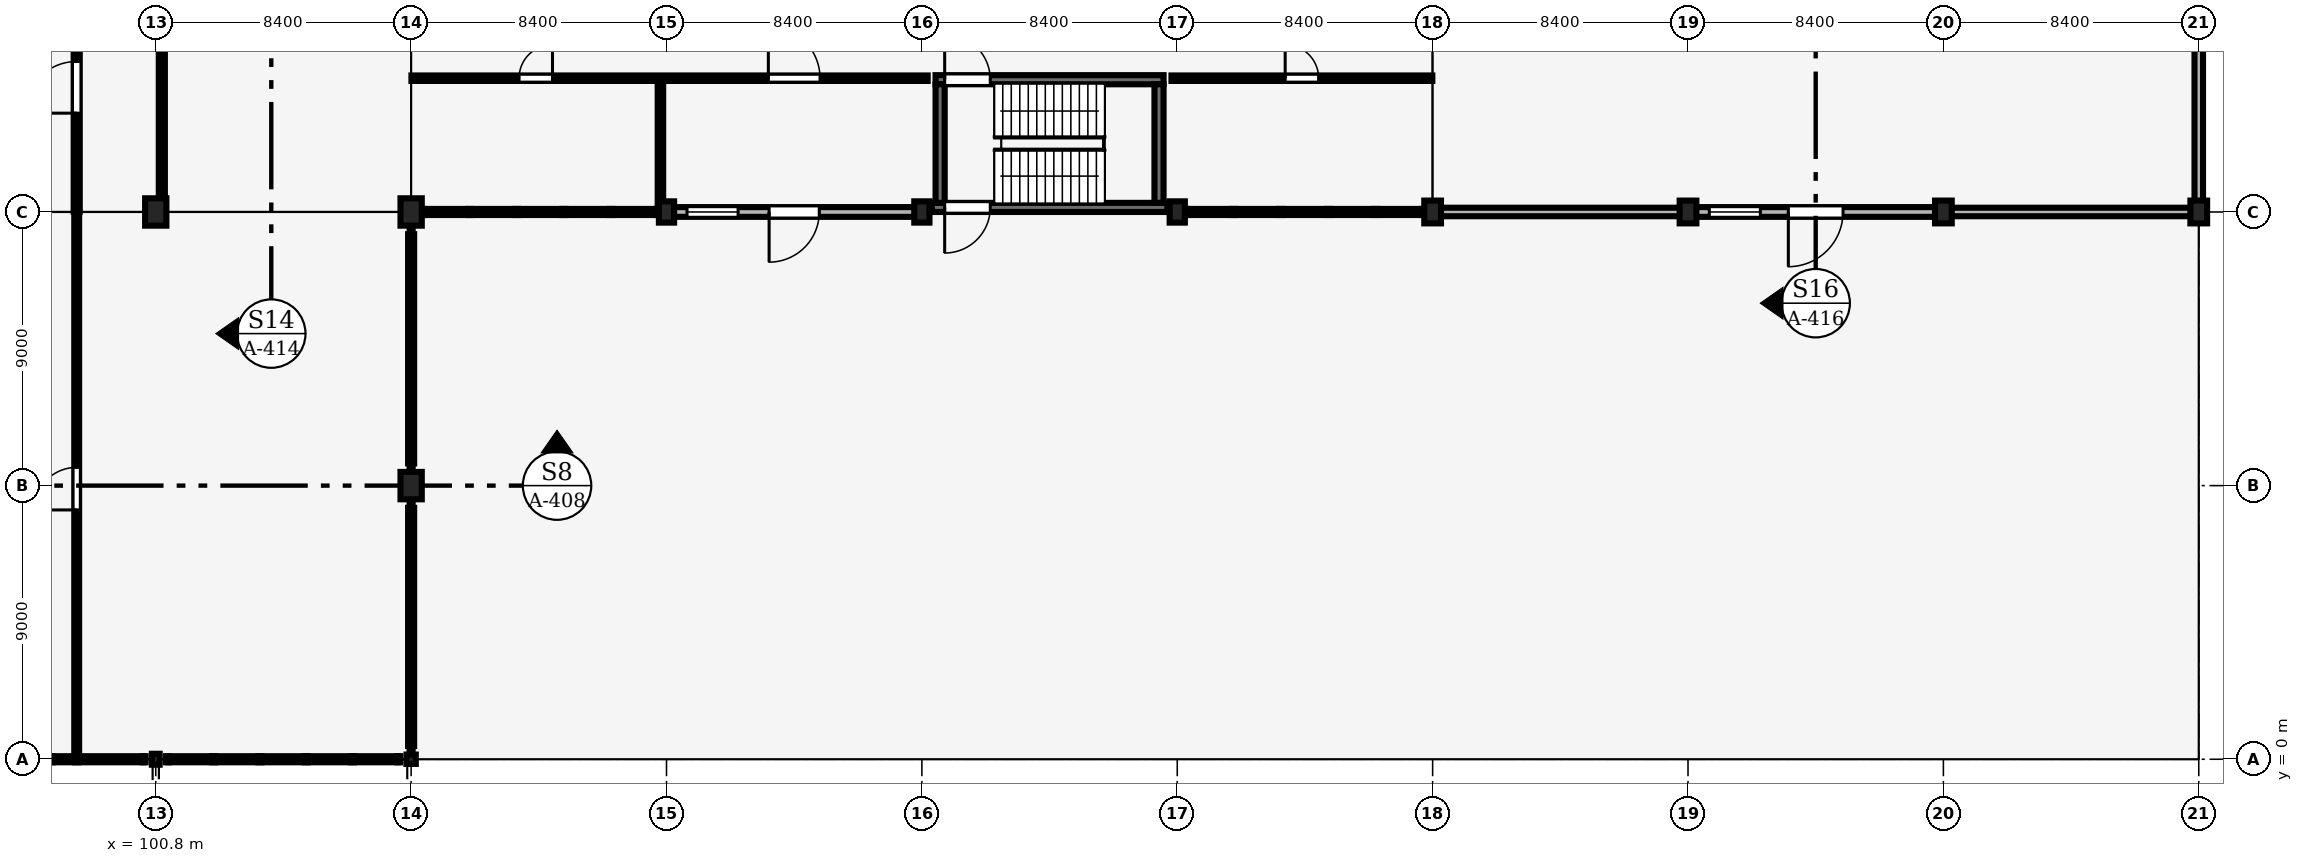
"""IFC4 building model, lengths in metres.
Left out: names, types, materials, properties, quantities, classifications, styles, units other than length and angle.
Written with IfcOpenShell. Run it as: python <this file> out.ifc"""

import sys

from ifc_helpers import new_model, si_unit, direction, frame, frame_2d, origin, origin_2d, place, context, subcontext, project, spatial, rectangle, i_section, extrude, element, fill, save


model = new_model("IFC4")
c1 = context("Model", 3, precision=1e-05, world=origin(), true_north=direction((0.0, 1.0)))
c2 = subcontext(c1, "Body", "Model", "MODEL_VIEW")
j1 = project(units=[si_unit("LENGTHUNIT", "METRE"), si_unit("PLANEANGLEUNIT", "RADIAN")], contexts=[c1])
p1 = place(None, origin())
s1 = spatial("IfcSite", under=j1, at=p1, CompositionType="ELEMENT")
p2 = place(p1, origin())
s2 = spatial("IfcBuilding", under=s1, at=p2, CompositionType="ELEMENT")
p3 = place(p2, origin())
s3 = spatial("IfcBuildingStorey", under=s2, at=p3, CompositionType="ELEMENT", Elevation=0.0)
p4 = place(p3, frame((100.8, 0.0, 0.0), z_axis=(0.0, 0.0, 1.0), x_axis=(1.0, 0.0, 0.0)))
e1 = element("IfcColumn", 1, at=p4, inside=s3, PredefinedType="COLUMN", context=c2, shape_type="SweptSolid", body=[
    extrude(i_section(OverallWidth=0.256, OverallDepth=0.36, WebThickness=0.011, FlangeThickness=0.02, FilletRadius=0.015, at=origin_2d()), origin(), (0.0, 0.0, 1.0), 4.8),
])
p5 = place(p3, frame((100.8, 18.0, 0.0), z_axis=(0.0, 0.0, 1.0), x_axis=(1.0, 0.0, 0.0)))
e2 = element("IfcColumn", 2, at=p5, inside=s3, PredefinedType="COLUMN", context=c2, shape_type="SweptSolid", body=[
    extrude(rectangle(XDim=0.7, YDim=0.9, at=origin_2d()), origin(), (0.0, 0.0, 1.0), 4.8),
])
p6 = place(p3, frame((109.2, 0.0, 0.0), z_axis=(0.0, 0.0, 1.0), x_axis=(1.0, 0.0, 0.0)))
e3 = element("IfcColumn", 3, at=p6, inside=s3, PredefinedType="COLUMN", context=c2, shape_type="SweptSolid", body=[
    extrude(i_section(OverallWidth=0.305, OverallDepth=0.308, WebThickness=0.01, FlangeThickness=0.015, FilletRadius=0.013, at=origin_2d()), origin(), (0.0, 0.0, 1.0), 4.8),
])
for number, where, z_axis, x_axis in (
    (4, (109.2, 9.0, 0.0), (0.0, 0.0, 1.0), (1.0, 0.0, 0.0)),
    (5, (109.2, 18.0, 0.0), (0.0, 0.0, 1.0), (1.0, 0.0, 0.0)),
):
    element("IfcColumn", number, at=place(p3, frame(where, z_axis=z_axis, x_axis=x_axis)), inside=s3, PredefinedType="COLUMN", context=c2, shape_type="SweptSolid", body=[
        extrude(rectangle(XDim=0.7, YDim=0.9, at=origin_2d()), origin(), (0.0, 0.0, 1.0), 4.8),
    ])
for number, where, z_axis, x_axis in (
    (6, (117.6, 18.0, 0.0), (0.0, 0.0, 1.0), (1.0, 0.0, 0.0)),
    (7, (126.0, 18.0, 0.0), (0.0, 0.0, 1.0), (1.0, 0.0, 0.0)),
    (8, (134.4, 18.0, 0.0), (0.0, 0.0, 1.0), (1.0, 0.0, 0.0)),
):
    element("IfcColumn", number, at=place(p3, frame(where, z_axis=z_axis, x_axis=x_axis)), inside=s3, PredefinedType="COLUMN", context=c2, shape_type="SweptSolid", body=[
        extrude(rectangle(XDim=0.5, YDim=0.7, at=origin_2d()), origin(), (0.0, 0.0, 1.0), 4.8),
    ])
for number, where, z_axis, x_axis in (
    (9, (142.8, 18.0, 0.0), (0.0, 0.0, 1.0), (1.0, 0.0, 0.0)),
    (10, (151.2, 18.0, 0.0), (0.0, 0.0, 1.0), (1.0, 0.0, 0.0)),
    (11, (159.6, 18.0, 0.0), (0.0, 0.0, 1.0), (1.0, 0.0, 0.0)),
    (12, (168.0, 18.0, 0.0), (0.0, 0.0, 1.0), (1.0, 0.0, 0.0)),
):
    element("IfcColumn", number, at=place(p3, frame(where, z_axis=z_axis, x_axis=x_axis)), inside=s3, PredefinedType="COLUMN", context=c2, shape_type="SweptSolid", body=[
        extrude(rectangle(XDim=0.55, YDim=0.75, at=origin_2d()), origin(), (0.0, 0.0, 1.0), 4.8),
    ])
p7 = place(p3, frame((117.825, 18.0, 0.0), z_axis=(0.0, 0.0, 1.0), x_axis=(1.0, 0.0, 0.0)))
e13 = element("IfcWall", 13, at=p7, inside=s3, PredefinedType="SOLIDWALL", context=c2, shape_type="SweptSolid", body=[
    extrude(rectangle(XDim=7.95, YDim=0.32, at=frame_2d((3.975, 0.0))), origin(), (0.0, 0.0, 1.0), 3.37),
])
p8 = place(p7, frame((4.8, 0.0, 0.0), z_axis=(0.0, 0.0, 1.0), x_axis=(-1.0, 0.0, 0.0)))
e14 = element("IfcOpeningElement", 14, at=p8, cuts=e13, PredefinedType="OPENING", context=c2, shape_type="SweptSolid", body=[
    extrude(rectangle(XDim=1.65, YDim=2.25, at=frame_2d((0.825, 1.125))), frame((0.0, 0.17, 0.0), z_axis=(0.0, -1.0, 0.0), x_axis=(1.0, 0.0, 0.0)), (0.0, 0.0, 1.0), 0.34),
])
p9 = place(p7, frame((0.45, 0.0, 0.95)))
e15 = element("IfcOpeningElement", 15, at=p9, cuts=e13, PredefinedType="OPENING", context=c2, shape_type="SweptSolid", body=[
    extrude(rectangle(XDim=1.68, YDim=1.8, at=frame_2d((0.84, 0.9))), frame((0.0, 0.17, 0.0), z_axis=(0.0, -1.0, 0.0), x_axis=(1.0, 0.0, 0.0)), (0.0, 0.0, 1.0), 0.34),
])
p10 = place(p3, frame((143.05, 18.0, 0.0), z_axis=(0.0, 0.0, 1.0), x_axis=(1.0, 0.0, 0.0)))
e16 = element("IfcWall", 16, at=p10, inside=s3, PredefinedType="SOLIDWALL", context=c2, shape_type="SweptSolid", body=[
    extrude(rectangle(XDim=7.9, YDim=0.28, at=frame_2d((3.95, 0.0))), origin(), (0.0, 0.0, 1.0), 4.267),
])
p11 = place(p3, frame((151.45, 18.0, 0.0), z_axis=(0.0, 0.0, 1.0), x_axis=(1.0, 0.0, 0.0)))
e17 = element("IfcWall", 17, at=p11, inside=s3, PredefinedType="SOLIDWALL", context=c2, shape_type="SweptSolid", body=[
    extrude(rectangle(XDim=7.9, YDim=0.32, at=frame_2d((3.95, 0.0))), origin(), (0.0, 0.0, 1.0), 4.267),
])
p12 = place(p11, frame((4.85, 0.0, 0.0), z_axis=(0.0, 0.0, 1.0), x_axis=(-1.0, 0.0, 0.0)))
e18 = element("IfcOpeningElement", 18, at=p12, cuts=e17, PredefinedType="OPENING", context=c2, shape_type="SweptSolid", body=[
    extrude(rectangle(XDim=1.8, YDim=2.35, at=frame_2d((0.9, 1.175))), frame((0.0, 0.17, 0.0), z_axis=(0.0, -1.0, 0.0), x_axis=(1.0, 0.0, 0.0)), (0.0, 0.0, 1.0), 0.34),
])
p13 = place(p11, frame((0.45, 0.0, 0.95)))
e19 = element("IfcOpeningElement", 19, at=p13, cuts=e17, PredefinedType="OPENING", context=c2, shape_type="SweptSolid", body=[
    extrude(rectangle(XDim=1.68, YDim=1.8, at=frame_2d((0.84, 0.9))), frame((0.0, 0.17, 0.0), z_axis=(0.0, -1.0, 0.0), x_axis=(1.0, 0.0, 0.0)), (0.0, 0.0, 1.0), 0.34),
])
p14 = place(p3, frame((159.85, 18.0, 0.0), z_axis=(0.0, 0.0, 1.0), x_axis=(1.0, 0.0, 0.0)))
e20 = element("IfcWall", 20, at=p14, inside=s3, PredefinedType="SOLIDWALL", context=c2, shape_type="SweptSolid", body=[
    extrude(rectangle(XDim=7.9, YDim=0.28, at=frame_2d((3.95, 0.0))), origin(), (0.0, 0.0, 1.0), 4.267),
])
p15 = place(p3, frame((168.0, 18.35, 0.0), z_axis=(0.0, 0.0, 1.0), x_axis=(0.0, 1.0, 0.0)))
e21 = element("IfcWall", 21, at=p15, inside=s3, PredefinedType="SOLIDWALL", context=c2, shape_type="SweptSolid", body=[
    extrude(rectangle(XDim=8.3, YDim=0.28, at=frame_2d((4.15, 0.0))), origin(), (0.0, 0.0, 1.0), 4.267),
])
p16 = place(p3, frame((126.325, 18.15, 0.0), z_axis=(0.0, 0.0, 1.0), x_axis=(1.0, 0.0, 0.0)))
e22 = element("IfcWall", 22, at=p16, inside=s3, PredefinedType="SHEAR", context=c2, shape_type="SweptSolid", body=[
    extrude(rectangle(XDim=7.75, YDim=0.3, at=frame_2d((3.875, 0.0))), origin(), (0.0, 0.0, 1.0), 4.625),
])
p17 = place(p16, frame((1.925, 0.0, 0.0), z_axis=(0.0, 0.0, 1.0), x_axis=(-1.0, 0.0, 0.0)))
e23 = element("IfcOpeningElement", 23, at=p17, cuts=e22, PredefinedType="OPENING", context=c2, shape_type="SweptSolid", body=[
    extrude(rectangle(XDim=1.5, YDim=2.2, at=frame_2d((0.75, 1.1))), frame((0.0, 0.16, 0.0), z_axis=(0.0, -1.0, 0.0), x_axis=(1.0, 0.0, 0.0)), (0.0, 0.0, 1.0), 0.32),
])
p18 = place(p3, frame((126.45, 22.35, 0.0), z_axis=(0.0, 0.0, 1.0), x_axis=(1.0, 0.0, 0.0)))
e24 = element("IfcWall", 24, at=p18, inside=s3, PredefinedType="SHEAR", context=c2, shape_type="SweptSolid", body=[
    extrude(rectangle(XDim=7.5, YDim=0.3, at=frame_2d((3.75, 0.0))), origin(), (0.0, 0.0, 1.0), 4.625),
])
p19 = place(p18, frame((0.3, 0.0, 0.0)))
e25 = element("IfcOpeningElement", 25, at=p19, cuts=e24, PredefinedType="OPENING", context=c2, shape_type="SweptSolid", body=[
    extrude(rectangle(XDim=1.5, YDim=2.2, at=frame_2d((0.75, 1.1))), frame((0.0, 0.16, 0.0), z_axis=(0.0, -1.0, 0.0), x_axis=(1.0, 0.0, 0.0)), (0.0, 0.0, 1.0), 0.32),
])
for number, where, z_axis, x_axis in (
    (26, (126.6, 18.3, 0.0), (0.0, 0.0, 1.0), (0.0, 1.0, 0.0)),
    (27, (133.8, 18.3, 0.0), (0.0, 0.0, 1.0), (0.0, 1.0, 0.0)),
):
    element("IfcWall", number, at=place(p3, frame(where, z_axis=z_axis, x_axis=x_axis)), inside=s3, PredefinedType="SHEAR", context=c2, shape_type="SweptSolid", body=[
        extrude(rectangle(XDim=3.9, YDim=0.3, at=frame_2d((1.95, 0.0))), origin(), (0.0, 0.0, 1.0), 4.625),
    ])
p20 = place(p3, frame((98.2, 18.01, 0.0), z_axis=(0.0, 0.0, 1.0), x_axis=(0.0, 1.0, 0.0)))
e28 = element("IfcWall", 28, at=p20, inside=s3, PredefinedType="PARTITIONING", context=c2, shape_type="SweptSolid", body=[
    extrude(rectangle(XDim=67.78, YDim=0.2, at=frame_2d((33.89, 0.0))), origin(), (0.0, 0.0, 1.0), 4.5),
])
p21 = place(p20, frame((3.24, 0.0, 0.0)))
e29 = element("IfcOpeningElement", 29, at=p21, cuts=e28, PredefinedType="OPENING", context=c2, shape_type="SweptSolid", body=[
    extrude(rectangle(XDim=1.7, YDim=2.25, at=frame_2d((0.85, 1.125))), frame((0.0, 0.11, 0.0), z_axis=(0.0, -1.0, 0.0), x_axis=(1.0, 0.0, 0.0)), (0.0, 0.0, 1.0), 0.22),
])
p22 = place(p20, frame((12.965, 0.0, 0.0)))
e30 = element("IfcOpeningElement", 30, at=p22, cuts=e28, PredefinedType="OPENING", context=c2, shape_type="SweptSolid", body=[
    extrude(rectangle(XDim=1.05, YDim=2.2, at=frame_2d((0.525, 1.1))), frame((0.0, 0.11, 0.0), z_axis=(0.0, -1.0, 0.0), x_axis=(1.0, 0.0, 0.0)), (0.0, 0.0, 1.0), 0.22),
])
p23 = place(p20, frame((21.94, 0.0, 0.0)))
e31 = element("IfcOpeningElement", 31, at=p23, cuts=e28, PredefinedType="OPENING", context=c2, shape_type="SweptSolid", body=[
    extrude(rectangle(XDim=1.1, YDim=2.15, at=frame_2d((0.55, 1.075))), frame((0.0, 0.11, 0.0), z_axis=(0.0, -1.0, 0.0), x_axis=(1.0, 0.0, 0.0)), (0.0, 0.0, 1.0), 0.22),
])
p24 = place(p20, frame((28.515, 0.0, 0.0)))
e32 = element("IfcOpeningElement", 32, at=p24, cuts=e28, PredefinedType="OPENING", context=c2, shape_type="SweptSolid", body=[
    extrude(rectangle(XDim=0.95, YDim=2.2, at=frame_2d((0.475, 1.1))), frame((0.0, 0.11, 0.0), z_axis=(0.0, -1.0, 0.0), x_axis=(1.0, 0.0, 0.0)), (0.0, 0.0, 1.0), 0.22),
])
p25 = place(p20, frame((34.115, 0.0, 0.0)))
e33 = element("IfcOpeningElement", 33, at=p25, cuts=e28, PredefinedType="OPENING", context=c2, shape_type="SweptSolid", body=[
    extrude(rectangle(XDim=0.95, YDim=2.2, at=frame_2d((0.475, 1.1))), frame((0.0, 0.11, 0.0), z_axis=(0.0, -1.0, 0.0), x_axis=(1.0, 0.0, 0.0)), (0.0, 0.0, 1.0), 0.22),
])
p26 = place(p20, frame((39.015, 0.0, 0.0)))
e34 = element("IfcOpeningElement", 34, at=p26, cuts=e28, PredefinedType="OPENING", context=c2, shape_type="SweptSolid", body=[
    extrude(rectangle(XDim=0.95, YDim=2.1, at=frame_2d((0.475, 1.05))), frame((0.0, 0.11, 0.0), z_axis=(0.0, -1.0, 0.0), x_axis=(1.0, 0.0, 0.0)), (0.0, 0.0, 1.0), 0.22),
])
p27 = place(p20, frame((47.19, 0.0, 0.0)))
e35 = element("IfcOpeningElement", 35, at=p27, cuts=e28, PredefinedType="OPENING", context=c2, shape_type="SweptSolid", body=[
    extrude(rectangle(XDim=1.0, YDim=2.25, at=frame_2d((0.5, 1.125))), frame((0.0, 0.11, 0.0), z_axis=(0.0, -1.0, 0.0), x_axis=(1.0, 0.0, 0.0)), (0.0, 0.0, 1.0), 0.22),
])
p28 = place(p20, frame((60.24, 0.0, 0.0)))
e36 = element("IfcOpeningElement", 36, at=p28, cuts=e28, PredefinedType="OPENING", context=c2, shape_type="SweptSolid", body=[
    extrude(rectangle(XDim=1.1, YDim=2.15, at=frame_2d((0.55, 1.075))), frame((0.0, 0.11, 0.0), z_axis=(0.0, -1.0, 0.0), x_axis=(1.0, 0.0, 0.0)), (0.0, 0.0, 1.0), 0.22),
])
p29 = place(p3, frame((101.0, 18.46, 0.0), z_axis=(0.0, 0.0, 1.0), x_axis=(0.0, 1.0, 0.0)))
e37 = element("IfcWall", 37, at=p29, inside=s3, PredefinedType="PARTITIONING", context=c2, shape_type="SweptSolid", body=[
    extrude(rectangle(XDim=8.08, YDim=0.2, at=frame_2d((4.04, 0.0))), origin(), (0.0, 0.0, 1.0), 3.84),
])
p30 = place(p29, frame((5.515, 0.0, 0.0)))
e38 = element("IfcOpeningElement", 38, at=p30, cuts=e37, PredefinedType="OPENING", context=c2, shape_type="SweptSolid", body=[
    extrude(rectangle(XDim=1.05, YDim=2.2, at=frame_2d((0.525, 1.1))), frame((0.0, 0.11, 0.0), z_axis=(0.0, -1.0, 0.0), x_axis=(1.0, 0.0, 0.0)), (0.0, 0.0, 1.0), 0.22),
])
p31 = place(p3, frame((117.4, 18.105, 0.0), z_axis=(0.0, 0.0, 1.0), x_axis=(0.0, 1.0, 0.0)))
e39 = element("IfcWall", 39, at=p31, inside=s3, PredefinedType="PARTITIONING", context=c2, shape_type="SweptSolid", body=[
    extrude(rectangle(XDim=4.2, YDim=0.18, at=frame_2d((2.1, 0.0))), origin(), (0.0, 0.0, 1.0), 3.72),
])
p32 = place(p3, frame((109.21, 22.4, 0.0), z_axis=(0.0, 0.0, 1.0), x_axis=(1.0, 0.0, 0.0)))
e40 = element("IfcWall", 40, at=p32, inside=s3, PredefinedType="PARTITIONING", context=c2, shape_type="SweptSolid", body=[
    extrude(rectangle(XDim=16.98, YDim=0.18, at=frame_2d((8.49, 0.0))), origin(), (0.0, 0.0, 1.0), 4.5),
])
p33 = place(p32, frame((3.54, 0.0, 0.0)))
e41 = element("IfcOpeningElement", 41, at=p33, cuts=e40, PredefinedType="OPENING", context=c2, shape_type="SweptSolid", body=[
    extrude(rectangle(XDim=1.1, YDim=2.3, at=frame_2d((0.55, 1.15))), frame((0.0, 0.1, 0.0), z_axis=(0.0, -1.0, 0.0), x_axis=(1.0, 0.0, 0.0)), (0.0, 0.0, 1.0), 0.2),
])
p34 = place(p32, frame((11.74, 0.0, 0.0)))
e42 = element("IfcOpeningElement", 42, at=p34, cuts=e40, PredefinedType="OPENING", context=c2, shape_type="SweptSolid", body=[
    extrude(rectangle(XDim=1.7, YDim=2.25, at=frame_2d((0.85, 1.125))), frame((0.0, 0.1, 0.0), z_axis=(0.0, -1.0, 0.0), x_axis=(1.0, 0.0, 0.0)), (0.0, 0.0, 1.0), 0.2),
])
p35 = place(p3, frame((134.21, 22.4, 0.0), z_axis=(0.0, 0.0, 1.0), x_axis=(1.0, 0.0, 0.0)))
e43 = element("IfcWall", 43, at=p35, inside=s3, PredefinedType="PARTITIONING", context=c2, shape_type="SweptSolid", body=[
    extrude(rectangle(XDim=8.58, YDim=0.18, at=frame_2d((4.29, 0.0))), origin(), (0.0, 0.0, 1.0), 4.5),
])
p36 = place(p35, frame((3.74, 0.0, 0.0)))
e44 = element("IfcOpeningElement", 44, at=p36, cuts=e43, PredefinedType="OPENING", context=c2, shape_type="SweptSolid", body=[
    extrude(rectangle(XDim=1.1, YDim=2.3, at=frame_2d((0.55, 1.15))), frame((0.0, 0.1, 0.0), z_axis=(0.0, -1.0, 0.0), x_axis=(1.0, 0.0, 0.0)), (0.0, 0.0, 1.0), 0.2),
])
p37 = place(p3, frame((98.2, 0.117, 0.0), z_axis=(0.0, 0.0, 1.0), x_axis=(0.0, 1.0, 0.0)))
e45 = element("IfcWall", 45, at=p37, inside=s3, PredefinedType="PARTITIONING", context=c2, shape_type="SweptSolid", body=[
    extrude(rectangle(XDim=17.873, YDim=0.16, at=frame_2d((8.936, 0.0))), origin(), (0.0, 0.0, 1.0), 4.5),
])
p38 = place(p37, frame((8.083, 0.0, 0.0)))
e46 = element("IfcOpeningElement", 46, at=p38, cuts=e45, PredefinedType="OPENING", context=c2, shape_type="SweptSolid", body=[
    extrude(rectangle(XDim=1.4, YDim=2.2, at=frame_2d((0.7, 1.1))), frame((0.0, 0.09, 0.0), z_axis=(0.0, -1.0, 0.0), x_axis=(1.0, 0.0, 0.0)), (0.0, 0.0, 1.0), 0.18),
])
p39 = place(p8, origin())
e47 = element("IfcDoor", 47, at=p39, inside=s3, OperationType="DOUBLE_DOOR_SINGLE_SWING", PredefinedType="DOOR", context=c2, shape_type="SweptSolid", body=[
    extrude(rectangle(XDim=1.65, YDim=2.25, at=frame_2d((0.825, 1.125))), frame((0.0, 0.025, 0.0), z_axis=(0.0, -1.0, 0.0), x_axis=(1.0, 0.0, 0.0)), (0.0, 0.0, 1.0), 0.05),
])
fill(e14, e47)
p40 = place(p9, origin())
e48 = element("IfcWindow", 48, at=p40, inside=s3, PartitioningType="SINGLE_PANEL", PredefinedType="WINDOW", context=c2, shape_type="SweptSolid", body=[
    extrude(rectangle(XDim=1.68, YDim=1.8, at=frame_2d((0.84, 0.9))), frame((0.0, 0.03, 0.0), z_axis=(0.0, -1.0, 0.0), x_axis=(1.0, 0.0, 0.0)), (0.0, 0.0, 1.0), 0.06),
])
fill(e15, e48)
p41 = place(p12, origin())
e49 = element("IfcDoor", 49, at=p41, inside=s3, OperationType="DOUBLE_DOOR_SINGLE_SWING", PredefinedType="DOOR", context=c2, shape_type="SweptSolid", body=[
    extrude(rectangle(XDim=1.8, YDim=2.35, at=frame_2d((0.9, 1.175))), frame((0.0, 0.025, 0.0), z_axis=(0.0, -1.0, 0.0), x_axis=(1.0, 0.0, 0.0)), (0.0, 0.0, 1.0), 0.05),
])
fill(e18, e49)
p42 = place(p13, origin())
e50 = element("IfcWindow", 50, at=p42, inside=s3, PartitioningType="SINGLE_PANEL", PredefinedType="WINDOW", context=c2, shape_type="SweptSolid", body=[
    extrude(rectangle(XDim=1.68, YDim=1.8, at=frame_2d((0.84, 0.9))), frame((0.0, 0.03, 0.0), z_axis=(0.0, -1.0, 0.0), x_axis=(1.0, 0.0, 0.0)), (0.0, 0.0, 1.0), 0.06),
])
fill(e19, e50)
p43 = place(p17, origin())
e51 = element("IfcDoor", 51, at=p43, inside=s3, OperationType="DOUBLE_DOOR_SINGLE_SWING", PredefinedType="DOOR", context=c2, shape_type="SweptSolid", body=[
    extrude(rectangle(XDim=1.5, YDim=2.2, at=frame_2d((0.75, 1.1))), frame((0.0, 0.025, 0.0), z_axis=(0.0, -1.0, 0.0), x_axis=(1.0, 0.0, 0.0)), (0.0, 0.0, 1.0), 0.05),
])
fill(e23, e51)
p44 = place(p19, origin())
e52 = element("IfcDoor", 52, at=p44, inside=s3, OperationType="DOUBLE_DOOR_SINGLE_SWING", PredefinedType="DOOR", context=c2, shape_type="SweptSolid", body=[
    extrude(rectangle(XDim=1.5, YDim=2.2, at=frame_2d((0.75, 1.1))), frame((0.0, 0.025, 0.0), z_axis=(0.0, -1.0, 0.0), x_axis=(1.0, 0.0, 0.0)), (0.0, 0.0, 1.0), 0.05),
])
fill(e25, e52)
p45 = place(p21, origin())
e53 = element("IfcDoor", 53, at=p45, inside=s3, OperationType="DOUBLE_DOOR_SINGLE_SWING", PredefinedType="DOOR", context=c2, shape_type="SweptSolid", body=[
    extrude(rectangle(XDim=1.7, YDim=2.25, at=frame_2d((0.85, 1.125))), frame((0.0, 0.025, 0.0), z_axis=(0.0, -1.0, 0.0), x_axis=(1.0, 0.0, 0.0)), (0.0, 0.0, 1.0), 0.05),
])
fill(e29, e53)
p46 = place(p33, origin())
e54 = element("IfcDoor", 54, at=p46, inside=s3, OperationType="SINGLE_SWING_RIGHT", PredefinedType="DOOR", context=c2, shape_type="SweptSolid", body=[
    extrude(rectangle(XDim=1.1, YDim=2.3, at=frame_2d((0.55, 1.15))), frame((0.0, 0.025, 0.0), z_axis=(0.0, -1.0, 0.0), x_axis=(1.0, 0.0, 0.0)), (0.0, 0.0, 1.0), 0.05),
])
fill(e41, e54)
p47 = place(p34, origin())
e55 = element("IfcDoor", 55, at=p47, inside=s3, OperationType="DOUBLE_DOOR_SINGLE_SWING", PredefinedType="DOOR", context=c2, shape_type="SweptSolid", body=[
    extrude(rectangle(XDim=1.7, YDim=2.25, at=frame_2d((0.85, 1.125))), frame((0.0, 0.025, 0.0), z_axis=(0.0, -1.0, 0.0), x_axis=(1.0, 0.0, 0.0)), (0.0, 0.0, 1.0), 0.05),
])
fill(e42, e55)
p48 = place(p36, origin())
e56 = element("IfcDoor", 56, at=p48, inside=s3, OperationType="SINGLE_SWING_LEFT", PredefinedType="DOOR", context=c2, shape_type="SweptSolid", body=[
    extrude(rectangle(XDim=1.1, YDim=2.3, at=frame_2d((0.55, 1.15))), frame((0.0, 0.025, 0.0), z_axis=(0.0, -1.0, 0.0), x_axis=(1.0, 0.0, 0.0)), (0.0, 0.0, 1.0), 0.05),
])
fill(e44, e56)
p49 = place(p38, origin())
e57 = element("IfcDoor", 57, at=p49, inside=s3, OperationType="DOUBLE_DOOR_SINGLE_SWING", PredefinedType="DOOR", context=c2, shape_type="SweptSolid", body=[
    extrude(rectangle(XDim=1.4, YDim=2.2, at=frame_2d((0.7, 1.1))), frame((0.0, 0.025, 0.0), z_axis=(0.0, -1.0, 0.0), x_axis=(1.0, 0.0, 0.0)), (0.0, 0.0, 1.0), 0.05),
])
fill(e46, e57)
save(model, sys.argv[1])
